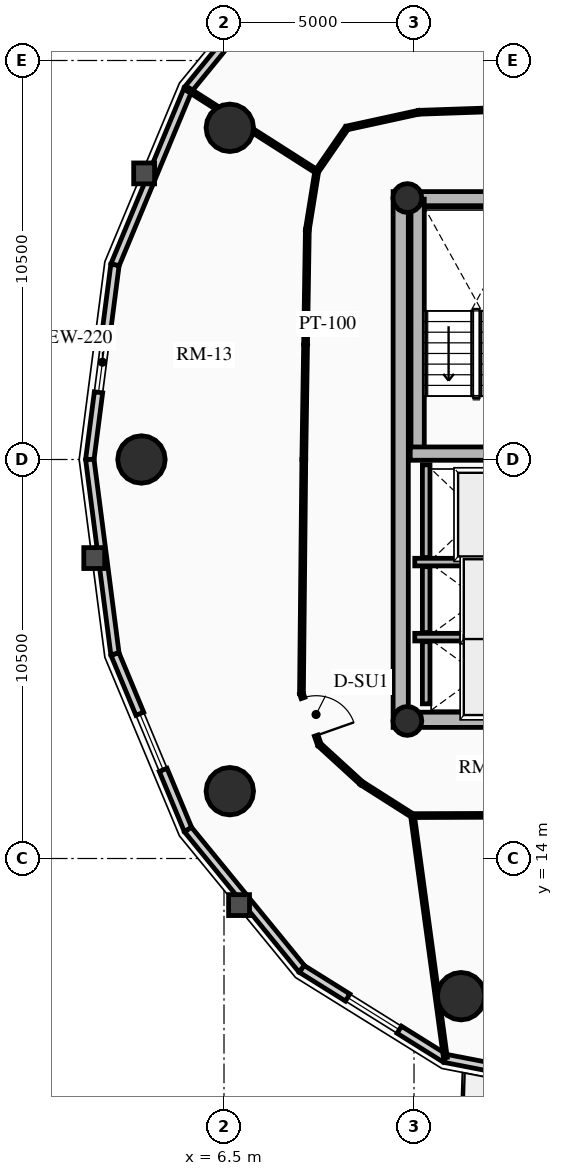
"""IFC4 building model, lengths in metres.
Left out: names, types, materials, properties, quantities, classifications, styles, units other than length and angle.
Written with IfcOpenShell. Run it as: python <this file> out.ifc"""

import sys

from ifc_helpers import new_model, si_unit, direction, frame, frame_2d, origin, origin_2d, place, context, subcontext, project, spatial, rectangle, circle, hollow_circle, extrude, source, transform, mapped, element, fill, save


model = new_model("IFC4")
c1 = context("Model", 3, precision=1e-05, world=origin(), true_north=direction((0.0, 1.0)))
c2 = subcontext(c1, "Body", "Model", "MODEL_VIEW")
j1 = project(units=[si_unit("LENGTHUNIT", "METRE"), si_unit("PLANEANGLEUNIT", "RADIAN")], contexts=[c1])
p1 = place(None, origin())
s1 = spatial("IfcSite", under=j1, at=p1, CompositionType="ELEMENT")
p2 = place(p1, origin())
s2 = spatial("IfcBuilding", under=s1, at=p2, CompositionType="ELEMENT")
p3 = place(p2, frame((0.0, 0.0, 189.43)))
s3 = spatial("IfcBuildingStorey", under=s2, at=p3, CompositionType="ELEMENT", Elevation=189.43)
p4 = place(p3, frame((11.15, 17.45, 0.0), z_axis=(0.0, 0.0, 1.0), x_axis=(0.0, 1.0, 0.0)))
e1 = element("IfcWall", 1, at=p4, inside=s3, PredefinedType="SHEAR", context=c2, shape_type="SweptSolid", body=[
    extrude(rectangle(XDim=14.1, YDim=0.4, at=frame_2d((7.05, 0.0))), origin(), (0.0, 0.0, 1.0), 2.91),
])
p5 = place(p3, frame((11.15, 17.65, 0.0), z_axis=(0.0, 0.0, 1.0), x_axis=(1.0, 0.0, 0.0)))
e2 = element("IfcWall", 2, at=p5, inside=s3, PredefinedType="SHEAR", context=c2, shape_type="SweptSolid", body=[
    extrude(rectangle(XDim=10.7, YDim=0.4, at=frame_2d((5.35, 0.0))), origin(), (0.0, 0.0, 1.0), 2.91),
])
m1 = source(origin(), c2, "Body", "SweptSolid", [
    extrude(rectangle(XDim=1.5, YDim=2.02, at=frame_2d((0.75, 1.01))), frame((0.0, 0.21, 0.0), z_axis=(0.0, -1.0, 0.0), x_axis=(1.0, 0.0, 0.0)), (0.0, 0.0, 1.0), 0.42),
])
p6 = place(p5, frame((5.45, 0.0, 0.0)))
e3 = element("IfcOpeningElement", 3, at=p6, cuts=e2, PredefinedType="OPENING", context=c2, shape_type="MappedRepresentation", body=[
    mapped(m1, transform((0.0, 0.0, 0.0), x_axis=(1.0, 0.0, 0.0), y_axis=(0.0, 1.0, 0.0), z_axis=(0.0, 0.0, 1.0), scale=1.0)),
])
p7 = place(p3, frame((11.15, 31.35, 0.0), z_axis=(0.0, 0.0, 1.0), x_axis=(1.0, 0.0, 0.0)))
e4 = element("IfcWall", 4, at=p7, inside=s3, PredefinedType="SHEAR", context=c2, shape_type="SweptSolid", body=[
    extrude(rectangle(XDim=10.7, YDim=0.4, at=frame_2d((5.35, 0.0))), origin(), (0.0, 0.0, 1.0), 2.91),
])
p8 = place(p7, frame((4.6, 0.0, 0.0)))
e5 = element("IfcOpeningElement", 5, at=p8, cuts=e4, PredefinedType="OPENING", context=c2, shape_type="MappedRepresentation", body=[
    mapped(m1, transform((0.0, 0.0, 0.0), x_axis=(1.0, 0.0, 0.0), y_axis=(0.0, 1.0, 0.0), z_axis=(0.0, 0.0, 1.0), scale=1.0)),
])
p9 = place(p3, frame((11.595, 24.655, 0.0), z_axis=(0.0, 0.0, 1.0), x_axis=(0.0, 1.0, 0.0)))
e6 = element("IfcWall", 6, at=p9, inside=s3, PredefinedType="SHEAR", context=c2, shape_type="SweptSolid", body=[
    extrude(rectangle(XDim=6.695, YDim=0.35, at=frame_2d((3.348, 0.0))), origin(), (0.0, 0.0, 1.0), 2.91),
])
p10 = place(p3, frame((11.4, 24.655, 0.0), z_axis=(0.0, 0.0, 1.0), x_axis=(1.0, 0.0, 0.0)))
e7 = element("IfcWall", 7, at=p10, inside=s3, PredefinedType="SHEAR", context=c2, shape_type="SweptSolid", body=[
    extrude(rectangle(XDim=3.285, YDim=0.35, at=frame_2d((1.643, 0.0))), origin(), (0.0, 0.0, 1.0), 2.91),
])
for number, where, z_axis, x_axis in (
    (8, (11.325, 17.62, 0.0), (0.0, 0.0, 1.0), (1.0, 0.0, 0.0)),
    (9, (11.325, 31.38, 0.0), (0.0, 0.0, 1.0), (1.0, 0.0, 0.0)),
):
    element("IfcColumn", number, at=place(p3, frame(where, z_axis=z_axis, x_axis=x_axis)), inside=s3, PredefinedType="COLUMN", context=c2, shape_type="SweptSolid", body=[
        extrude(hollow_circle(Radius=0.38, WallThickness=0.032, at=origin_2d()), origin(), (0.0, 0.0, 1.0), 2.91),
    ])
for number, where, z_axis, x_axis in (
    (10, (6.653, 33.229, 0.0), (0.0, 0.0, 1.0), (1.0, 0.0, 0.0)),
    (11, (4.328, 24.5, 0.0), (0.0, 0.0, 1.0), (1.0, 0.0, 0.0)),
    (12, (6.653, 15.771, 0.0), (0.0, 0.0, 1.0), (1.0, 0.0, 0.0)),
    (13, (12.739, 10.377, 0.0), (0.0, 0.0, 1.0), (1.0, 0.0, 0.0)),
):
    element("IfcColumn", number, at=place(p3, frame(where, z_axis=z_axis, x_axis=x_axis)), inside=s3, PredefinedType="USERDEFINED", context=c2, shape_type="SweptSolid", body=[
        extrude(circle(Radius=0.625, at=origin_2d()), origin(), (0.0, 0.0, 1.0), 2.91),
    ])
p11 = place(p3, frame((5.553, 34.24, 0.0), z_axis=(0.0, 0.0, 1.0), x_axis=(0.632470615287, 0.774584353572, 0.0)))
e14 = element("IfcWall", 14, at=p11, inside=s3, PredefinedType="SOLIDWALL", context=c2, shape_type="SweptSolid", body=[
    extrude(rectangle(XDim=4.733, YDim=0.22, at=frame_2d((2.366, 0.0))), origin(), (0.0, 0.0, 1.0), 2.125),
])
m2 = source(origin(), c2, "Body", "SweptSolid", [
    extrude(rectangle(XDim=1.6, YDim=1.3, at=frame_2d((0.8, 0.65))), frame((0.0, 0.12, 0.0), z_axis=(0.0, -1.0, 0.0), x_axis=(1.0, 0.0, 0.0)), (0.0, 0.0, 1.0), 0.24),
])
p12 = place(p11, frame((1.566, 0.0, 0.65)))
e15 = element("IfcOpeningElement", 15, at=p12, cuts=e14, PredefinedType="OPENING", context=c2, shape_type="MappedRepresentation", body=[
    mapped(m2, transform((0.0, 0.0, 0.0), x_axis=(1.0, 0.0, 0.0), y_axis=(0.0, 1.0, 0.0), z_axis=(0.0, 0.0, 1.0), scale=1.0)),
])
p13 = place(p3, frame((3.631, 29.62, 0.0), z_axis=(0.0, 0.0, 1.0), x_axis=(0.384144094086, 0.923273152961, 0.0)))
e16 = element("IfcWall", 16, at=p13, inside=s3, PredefinedType="SOLIDWALL", context=c2, shape_type="SweptSolid", body=[
    extrude(rectangle(XDim=5.003, YDim=0.22, at=frame_2d((2.501, 0.0))), origin(), (0.0, 0.0, 1.0), 2.125),
])
p14 = place(p3, frame((2.969, 24.5, 0.0), z_axis=(0.0, 0.0, 1.0), x_axis=(0.128287912609, 0.991736966881, 0.0)))
e17 = element("IfcWall", 17, at=p14, inside=s3, PredefinedType="SOLIDWALL", context=c2, shape_type="SweptSolid", body=[
    extrude(rectangle(XDim=5.163, YDim=0.22, at=frame_2d((2.582, 0.0))), origin(), (0.0, 0.0, 1.0), 2.125),
])
p15 = place(p14, frame((1.782, 0.0, 0.65)))
e18 = element("IfcOpeningElement", 18, at=p15, cuts=e17, PredefinedType="OPENING", context=c2, shape_type="MappedRepresentation", body=[
    mapped(m2, transform((0.0, 0.0, 0.0), x_axis=(1.0, 0.0, 0.0), y_axis=(0.0, 1.0, 0.0), z_axis=(0.0, 0.0, 1.0), scale=1.0)),
])
p16 = place(p3, frame((3.631, 19.38, 0.0), z_axis=(0.0, 0.0, 1.0), x_axis=(-0.128287912609, 0.991736966881, 0.0)))
e19 = element("IfcWall", 19, at=p16, inside=s3, PredefinedType="SOLIDWALL", context=c2, shape_type="SweptSolid", body=[
    extrude(rectangle(XDim=5.163, YDim=0.22, at=frame_2d((2.582, 0.0))), origin(), (0.0, 0.0, 1.0), 2.125),
])
p17 = place(p3, frame((5.553, 14.76, 0.0), z_axis=(0.0, 0.0, 1.0), x_axis=(-0.384144094086, 0.923273152961, 0.0)))
e20 = element("IfcWall", 20, at=p17, inside=s3, PredefinedType="SOLIDWALL", context=c2, shape_type="SweptSolid", body=[
    extrude(rectangle(XDim=5.003, YDim=0.22, at=frame_2d((2.501, 0.0))), origin(), (0.0, 0.0, 1.0), 2.125),
])
p18 = place(p17, frame((1.702, 0.0, 0.65)))
e21 = element("IfcOpeningElement", 21, at=p18, cuts=e20, PredefinedType="OPENING", context=c2, shape_type="MappedRepresentation", body=[
    mapped(m2, transform((0.0, 0.0, 0.0), x_axis=(1.0, 0.0, 0.0), y_axis=(0.0, 1.0, 0.0), z_axis=(0.0, 0.0, 1.0), scale=1.0)),
])
p19 = place(p3, frame((8.547, 11.094, 0.0), z_axis=(0.0, 0.0, 1.0), x_axis=(-0.632470615287, 0.774584353572, 0.0)))
e22 = element("IfcWall", 22, at=p19, inside=s3, PredefinedType="SOLIDWALL", context=c2, shape_type="SweptSolid", body=[
    extrude(rectangle(XDim=4.733, YDim=0.22, at=frame_2d((2.366, 0.0))), origin(), (0.0, 0.0, 1.0), 2.125),
])
p20 = place(p3, frame((12.319, 8.741, 0.0), z_axis=(0.0, 0.0, 1.0), x_axis=(-0.848399108042, 0.529357113368, 0.0)))
e23 = element("IfcWall", 23, at=p20, inside=s3, PredefinedType="SOLIDWALL", context=c2, shape_type="SweptSolid", body=[
    extrude(rectangle(XDim=4.446, YDim=0.22, at=frame_2d((2.223, 0.0))), origin(), (0.0, 0.0, 1.0), 2.125),
])
p21 = place(p20, frame((1.423, 0.0, 0.65)))
e24 = element("IfcOpeningElement", 24, at=p21, cuts=e23, PredefinedType="OPENING", context=c2, shape_type="MappedRepresentation", body=[
    mapped(m2, transform((0.0, 0.0, 0.0), x_axis=(1.0, 0.0, 0.0), y_axis=(0.0, 1.0, 0.0), z_axis=(0.0, 0.0, 1.0), scale=1.0)),
])
p22 = place(p3, frame((16.5, 7.93, 0.0), z_axis=(0.0, 0.0, 1.0), x_axis=(-0.981703883443, 0.190413983815, 0.0)))
e25 = element("IfcWall", 25, at=p22, inside=s3, PredefinedType="SOLIDWALL", context=c2, shape_type="SweptSolid", body=[
    extrude(rectangle(XDim=4.259, YDim=0.22, at=frame_2d((2.13, 0.0))), origin(), (0.0, 0.0, 1.0), 2.125),
])
m3 = source(origin(), c2, "Body", "SweptSolid", [
    extrude(rectangle(XDim=1.15, YDim=2.005, at=frame_2d((0.575, 1.002))), frame((0.0, 0.12, 0.0), z_axis=(0.0, -1.0, 0.0), x_axis=(1.0, 0.0, 0.0)), (0.0, 0.0, 1.0), 0.24),
])
p23 = place(p22, frame((1.555, 0.0, 0.0)))
e26 = element("IfcOpeningElement", 26, at=p23, cuts=e25, PredefinedType="OPENING", context=c2, shape_type="MappedRepresentation", body=[
    mapped(m3, transform((0.0, 0.0, 0.0), x_axis=(1.0, 0.0, 0.0), y_axis=(0.0, 1.0, 0.0), z_axis=(0.0, 0.0, 1.0), scale=1.0)),
])
p24 = place(p3, frame((11.52, 21.8, 0.0), z_axis=(0.0, 0.0, 1.0), x_axis=(1.0, 0.0, 0.0)))
e27 = element("IfcWall", 27, at=p24, inside=s3, PredefinedType="SHEAR", context=c2, shape_type="SweptSolid", body=[
    extrude(rectangle(XDim=2.97, YDim=0.2, at=frame_2d((1.485, 0.0))), origin(), (0.0, 0.0, 1.0), 2.91),
])
p25 = place(p3, frame((11.82, 21.92, 0.0), z_axis=(0.0, 0.0, 1.0), x_axis=(0.0, 1.0, 0.0)))
e28 = element("IfcWall", 28, at=p25, inside=s3, PredefinedType="SHEAR", context=c2, shape_type="SweptSolid", body=[
    extrude(rectangle(XDim=2.44, YDim=0.2, at=frame_2d((1.22, 0.0))), origin(), (0.0, 0.0, 1.0), 2.91),
])
p26 = place(p3, frame((11.52, 19.825, 0.0), z_axis=(0.0, 0.0, 1.0), x_axis=(1.0, 0.0, 0.0)))
e29 = element("IfcWall", 29, at=p26, inside=s3, PredefinedType="SHEAR", context=c2, shape_type="SweptSolid", body=[
    extrude(rectangle(XDim=2.97, YDim=0.2, at=frame_2d((1.485, 0.0))), origin(), (0.0, 0.0, 1.0), 2.91),
])
p27 = place(p3, frame((11.82, 19.945, 0.0), z_axis=(0.0, 0.0, 1.0), x_axis=(0.0, 1.0, 0.0)))
e30 = element("IfcWall", 30, at=p27, inside=s3, PredefinedType="SHEAR", context=c2, shape_type="SweptSolid", body=[
    extrude(rectangle(XDim=1.735, YDim=0.2, at=frame_2d((0.867, 0.0))), origin(), (0.0, 0.0, 1.0), 2.91),
])
p28 = place(p3, frame((11.82, 18.07, 0.0), z_axis=(0.0, 0.0, 1.0), x_axis=(0.0, 1.0, 0.0)))
e31 = element("IfcWall", 31, at=p28, inside=s3, PredefinedType="SHEAR", context=c2, shape_type="SweptSolid", body=[
    extrude(rectangle(XDim=1.635, YDim=0.2, at=frame_2d((0.817, 0.0))), origin(), (0.0, 0.0, 1.0), 2.91),
])
p29 = place(p3, frame((18.143, 33.86, 0.0), z_axis=(0.0, 0.0, 1.0), x_axis=(-0.999419208319, -0.034077060363, 0.0)))
e32 = element("IfcWall", 32, at=p29, inside=s3, PredefinedType="MOVABLE", context=c2, shape_type="SweptSolid", body=[
    extrude(rectangle(XDim=6.527, YDim=0.1, at=frame_2d((3.263, 0.0))), origin(), (0.0, 0.0, 1.0), 2.125),
])
m4 = source(origin(), c2, "Body", "SweptSolid", [
    extrude(rectangle(XDim=1.05, YDim=2.015, at=frame_2d((0.525, 1.007))), frame((0.0, 0.06, 0.0), z_axis=(0.0, -1.0, 0.0), x_axis=(1.0, 0.0, 0.0)), (0.0, 0.0, 1.0), 0.12),
])
p30 = place(p29, frame((2.738, 0.0, 0.0)))
e33 = element("IfcOpeningElement", 33, at=p30, cuts=e32, PredefinedType="OPENING", context=c2, shape_type="MappedRepresentation", body=[
    mapped(m4, transform((0.0, 0.0, 0.0), x_axis=(1.0, 0.0, 0.0), y_axis=(0.0, 1.0, 0.0), z_axis=(0.0, 0.0, 1.0), scale=1.0)),
])
p31 = place(p3, frame((11.62, 33.637, 0.0), z_axis=(0.0, 0.0, 1.0), x_axis=(-0.97702579435, -0.213121085711, 0.0)))
e34 = element("IfcWall", 34, at=p31, inside=s3, PredefinedType="MOVABLE", context=c2, shape_type="SweptSolid", body=[
    extrude(rectangle(XDim=1.935, YDim=0.1, at=frame_2d((0.967, 0.0))), origin(), (0.0, 0.0, 1.0), 2.125),
])
p32 = place(p3, frame((9.729, 33.225, 0.0), z_axis=(0.0, 0.0, 1.0), x_axis=(-0.567183649484, -0.82359134755, 0.0)))
e35 = element("IfcWall", 35, at=p32, inside=s3, PredefinedType="MOVABLE", context=c2, shape_type="SweptSolid", body=[
    extrude(rectangle(XDim=1.392, YDim=0.1, at=frame_2d((0.696, 0.0))), origin(), (0.0, 0.0, 1.0), 2.125),
])
p33 = place(p3, frame((8.94, 32.078, 0.0), z_axis=(0.0, 0.0, 1.0), x_axis=(-0.159148467753, -0.98725466077, 0.0)))
e36 = element("IfcWall", 36, at=p33, inside=s3, PredefinedType="MOVABLE", context=c2, shape_type="SweptSolid", body=[
    extrude(rectangle(XDim=1.554, YDim=0.1, at=frame_2d((0.777, 0.0))), origin(), (0.0, 0.0, 1.0), 2.125),
])
p34 = place(p3, frame((8.693, 30.544, 0.0), z_axis=(0.0, 0.0, 1.0), x_axis=(-0.015307007986, -0.99988284089, 0.0)))
e37 = element("IfcWall", 37, at=p34, inside=s3, PredefinedType="MOVABLE", context=c2, shape_type="SweptSolid", body=[
    extrude(rectangle(XDim=6.045, YDim=0.1, at=frame_2d((3.022, 0.0))), origin(), (0.0, 0.0, 1.0), 2.555),
])
p35 = place(p3, frame((8.6, 24.5, 0.0), z_axis=(0.0, 0.0, 1.0), x_axis=(-0.010023665349, -0.999949761805, 0.0)))
e38 = element("IfcWall", 38, at=p35, inside=s3, PredefinedType="MOVABLE", context=c2, shape_type="SweptSolid", body=[
    extrude(rectangle(XDim=6.162, YDim=0.1, at=frame_2d((3.081, 0.0))), origin(), (0.0, 0.0, 1.0), 2.125),
])
p36 = place(p3, frame((8.538, 18.338, 0.0), z_axis=(0.0, 0.0, 1.0), x_axis=(0.331358150167, -0.94350504838, 0.0)))
e39 = element("IfcWall", 39, at=p36, inside=s3, PredefinedType="MOVABLE", context=c2, shape_type="SweptSolid", body=[
    extrude(rectangle(XDim=1.424, YDim=0.1, at=frame_2d((0.712, 0.0))), origin(), (0.0, 0.0, 1.0), 2.125),
])
p37 = place(p36, frame((0.12, 0.0, 0.0)))
e40 = element("IfcOpeningElement", 40, at=p37, cuts=e39, PredefinedType="OPENING", context=c2, shape_type="MappedRepresentation", body=[
    mapped(m4, transform((0.0, 0.0, 0.0), x_axis=(1.0, 0.0, 0.0), y_axis=(0.0, 1.0, 0.0), z_axis=(0.0, 0.0, 1.0), scale=1.0)),
])
p38 = place(p3, frame((9.01, 16.994, 0.0), z_axis=(0.0, 0.0, 1.0), x_axis=(0.737701798986, -0.67512669609, 0.0)))
e41 = element("IfcWall", 41, at=p38, inside=s3, PredefinedType="MOVABLE", context=c2, shape_type="SweptSolid", body=[
    extrude(rectangle(XDim=1.498, YDim=0.1, at=frame_2d((0.749, 0.0))), origin(), (0.0, 0.0, 1.0), 2.125),
])
p39 = place(p3, frame((10.115, 15.983, 0.0), z_axis=(0.0, 0.0, 1.0), x_axis=(0.843995849351, -0.536349705209, 0.0)))
e42 = element("IfcWall", 42, at=p39, inside=s3, PredefinedType="MOVABLE", context=c2, shape_type="SweptSolid", body=[
    extrude(rectangle(XDim=1.593, YDim=0.1, at=frame_2d((0.796, 0.0))), origin(), (0.0, 0.0, 1.0), 2.125),
])
p40 = place(p3, frame((11.46, 15.129, 0.0), z_axis=(0.0, 0.0, 1.0), x_axis=(0.999993513287, 0.003601858435, 0.0)))
e43 = element("IfcWall", 43, at=p40, inside=s3, PredefinedType="MOVABLE", context=c2, shape_type="SweptSolid", body=[
    extrude(rectangle(XDim=3.321, YDim=0.1, at=frame_2d((1.661, 0.0))), origin(), (0.0, 0.0, 1.0), 2.125),
])
p41 = place(p3, frame((8.94, 32.078, 0.0), z_axis=(0.0, 0.0, 1.0), x_axis=(-0.843153138911, 0.53767349232, 0.0)))
e44 = element("IfcWall", 44, at=p41, inside=s3, PredefinedType="MOVABLE", context=c2, shape_type="SweptSolid", body=[
    extrude(rectangle(XDim=3.998, YDim=0.1, at=frame_2d((1.999, 0.0))), origin(), (0.0, 0.0, 1.0), 2.125),
])
p42 = place(p3, frame((11.46, 15.129, 0.0), z_axis=(0.0, 0.0, 1.0), x_axis=(0.134621607411, -0.990897079831, 0.0)))
e45 = element("IfcWall", 45, at=p42, inside=s3, PredefinedType="MOVABLE", context=c2, shape_type="SweptSolid", body=[
    extrude(rectangle(XDim=6.427, YDim=0.1, at=frame_2d((3.214, 0.0))), origin(), (0.0, 0.0, 1.0), 2.125),
])
m5 = source(origin(), c2, "Body", "SweptSolid", [
    extrude(rectangle(XDim=1.6, YDim=1.3, at=frame_2d((0.8, 0.65))), frame((0.0, 0.03, 0.0), z_axis=(0.0, -1.0, 0.0), x_axis=(1.0, 0.0, 0.0)), (0.0, 0.0, 1.0), 0.06),
])
p43 = place(p15, origin())
e46 = element("IfcWindow", 46, at=p43, inside=s3, PartitioningType="SINGLE_PANEL", PredefinedType="WINDOW", context=c2, shape_type="MappedRepresentation", body=[
    mapped(m5, transform((0.0, 0.0, 0.0), x_axis=(1.0, 0.0, 0.0), y_axis=(0.0, 1.0, 0.0), z_axis=(0.0, 0.0, 1.0), scale=1.0)),
])
fill(e18, e46)
p44 = place(p18, origin())
e47 = element("IfcWindow", 47, at=p44, inside=s3, PartitioningType="SINGLE_PANEL", PredefinedType="WINDOW", context=c2, shape_type="MappedRepresentation", body=[
    mapped(m5, transform((0.0, 0.0, 0.0), x_axis=(1.0, 0.0, 0.0), y_axis=(0.0, 1.0, 0.0), z_axis=(0.0, 0.0, 1.0), scale=1.0)),
])
fill(e21, e47)
p45 = place(p21, origin())
e48 = element("IfcWindow", 48, at=p45, inside=s3, PartitioningType="SINGLE_PANEL", PredefinedType="WINDOW", context=c2, shape_type="MappedRepresentation", body=[
    mapped(m5, transform((0.0, 0.0, 0.0), x_axis=(1.0, 0.0, 0.0), y_axis=(0.0, 1.0, 0.0), z_axis=(0.0, 0.0, 1.0), scale=1.0)),
])
fill(e24, e48)
m6 = source(origin(), c2, "Body", "SweptSolid", [
    extrude(rectangle(XDim=1.05, YDim=2.015, at=frame_2d((0.525, 1.007))), frame((0.0, 0.025, 0.0), z_axis=(0.0, -1.0, 0.0), x_axis=(1.0, 0.0, 0.0)), (0.0, 0.0, 1.0), 0.05),
])
p46 = place(p37, origin())
e49 = element("IfcDoor", 49, at=p46, inside=s3, OperationType="SINGLE_SWING_RIGHT", PredefinedType="DOOR", context=c2, shape_type="MappedRepresentation", body=[
    mapped(m6, transform((0.0, 0.0, 0.0), x_axis=(1.0, 0.0, 0.0), y_axis=(0.0, 1.0, 0.0), z_axis=(0.0, 0.0, 1.0), scale=1.0)),
])
fill(e40, e49)
save(model, sys.argv[1])
